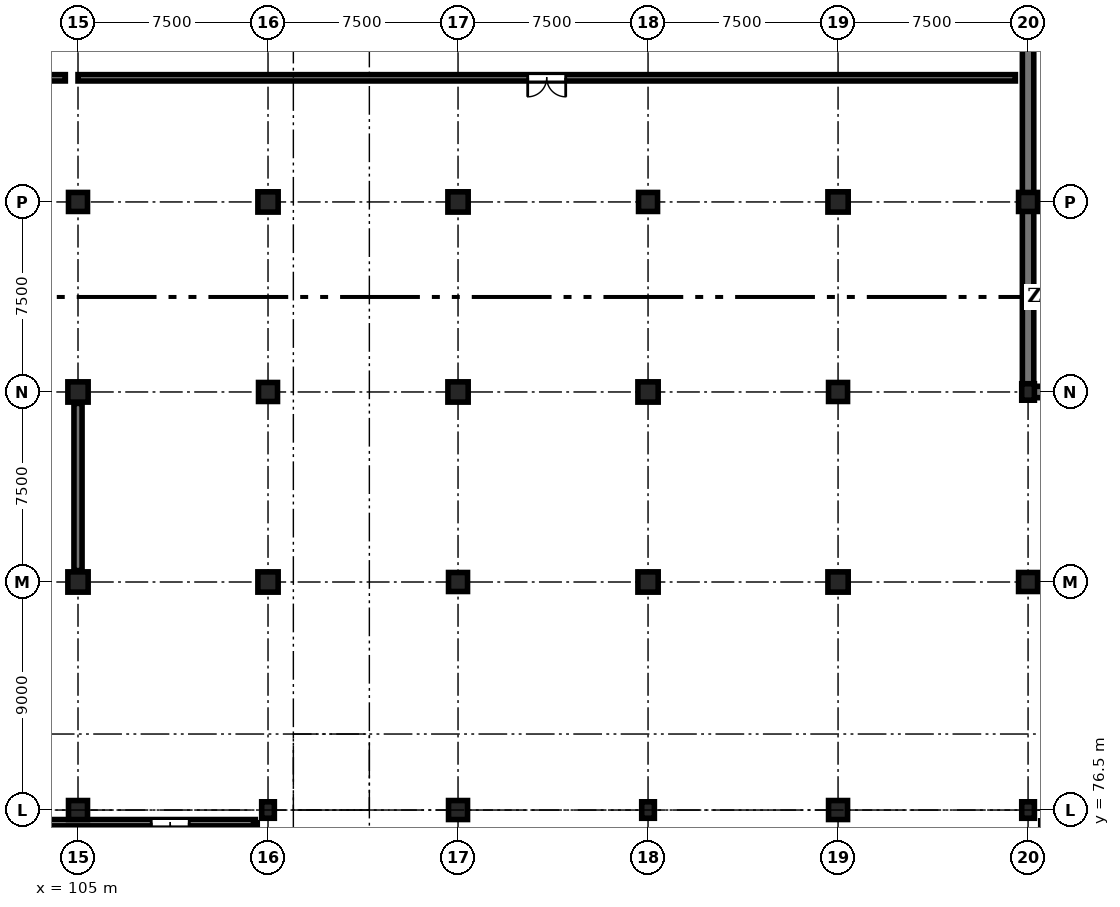
"""IFC4 building model, lengths in metres.
Left out: names, types, materials, properties, quantities, classifications, styles, units other than length and angle.
Written with IfcOpenShell. Run it as: python <this file> out.ifc"""

import sys

from ifc_helpers import new_model, si_unit, direction, frame, frame_2d, origin, origin_2d, place, context, subcontext, project, spatial, rectangle, circle, extrude, element, fill, save


model = new_model("IFC4")
c1 = context("Model", 3, precision=1e-05, world=origin(), true_north=direction((0.0, 1.0)))
c2 = subcontext(c1, "Body", "Model", "MODEL_VIEW")
j1 = project(units=[si_unit("LENGTHUNIT", "METRE"), si_unit("PLANEANGLEUNIT", "RADIAN")], contexts=[c1])
p1 = place(None, origin())
s1 = spatial("IfcSite", under=j1, at=p1, CompositionType="ELEMENT")
p2 = place(p1, origin())
s2 = spatial("IfcBuilding", under=s1, at=p2, CompositionType="ELEMENT")
p3 = place(p2, frame((0.0, 0.0, -4.5)))
s3 = spatial("IfcBuildingStorey", under=s2, at=p3, CompositionType="ELEMENT", Elevation=-4.5)
p4 = place(p3, frame((105.0, 76.5, 0.0), z_axis=(0.0, 0.0, 1.0), x_axis=(1.0, 0.0, 0.0)))
e1 = element("IfcColumn", 1, at=p4, inside=s3, PredefinedType="COLUMN", context=c2, shape_type="SweptSolid", body=[
    extrude(rectangle(XDim=0.75, YDim=0.75, at=origin_2d()), origin(), (0.0, 0.0, 1.0), 4.5),
])
for number, where, z_axis, x_axis in (
    (2, (105.0, 85.5, 0.0), (0.0, 0.0, 1.0), (1.0, 0.0, 0.0)),
    (3, (105.0, 93.0, 0.0), (0.0, 0.0, 1.0), (1.0, 0.0, 0.0)),
):
    element("IfcColumn", number, at=place(p3, frame(where, z_axis=z_axis, x_axis=x_axis)), inside=s3, PredefinedType="COLUMN", context=c2, shape_type="SweptSolid", body=[
        extrude(rectangle(XDim=0.8, YDim=0.8, at=origin_2d()), origin(), (0.0, 0.0, 1.0), 4.5),
    ])
p5 = place(p3, frame((105.0, 100.5, 0.0), z_axis=(0.0, 0.0, 1.0), x_axis=(1.0, 0.0, 0.0)))
e4 = element("IfcColumn", 4, at=p5, inside=s3, PredefinedType="COLUMN", context=c2, shape_type="SweptSolid", body=[
    extrude(circle(Radius=0.375, at=origin_2d()), origin(), (0.0, 0.0, 1.0), 4.5),
])
p6 = place(p3, frame((112.5, 76.5, 0.0), z_axis=(0.0, 0.0, 1.0), x_axis=(1.0, 0.0, 0.0)))
e5 = element("IfcColumn", 5, at=p6, inside=s3, PredefinedType="COLUMN", context=c2, shape_type="SweptSolid", body=[
    extrude(rectangle(XDim=0.5, YDim=0.65, at=origin_2d()), origin(), (0.0, 0.0, 1.0), 4.5),
])
p7 = place(p3, frame((112.5, 85.5, 0.0), z_axis=(0.0, 0.0, 1.0), x_axis=(1.0, 0.0, 0.0)))
e6 = element("IfcColumn", 6, at=p7, inside=s3, PredefinedType="COLUMN", context=c2, shape_type="SweptSolid", body=[
    extrude(rectangle(XDim=0.8, YDim=0.8, at=origin_2d()), origin(), (0.0, 0.0, 1.0), 4.5),
])
p8 = place(p3, frame((112.5, 93.0, 0.0), z_axis=(0.0, 0.0, 1.0), x_axis=(1.0, 0.0, 0.0)))
e7 = element("IfcColumn", 7, at=p8, inside=s3, PredefinedType="COLUMN", context=c2, shape_type="SweptSolid", body=[
    extrude(circle(Radius=0.375, at=origin_2d()), origin(), (0.0, 0.0, 1.0), 4.5),
])
p9 = place(p3, frame((112.5, 100.5, 0.0), z_axis=(0.0, 0.0, 1.0), x_axis=(1.0, 0.0, 0.0)))
e8 = element("IfcColumn", 8, at=p9, inside=s3, PredefinedType="COLUMN", context=c2, shape_type="SweptSolid", body=[
    extrude(rectangle(XDim=0.8, YDim=0.8, at=origin_2d()), origin(), (0.0, 0.0, 1.0), 4.5),
])
p10 = place(p3, frame((120.0, 76.5, 0.0), z_axis=(0.0, 0.0, 1.0), x_axis=(1.0, 0.0, 0.0)))
e9 = element("IfcColumn", 9, at=p10, inside=s3, PredefinedType="COLUMN", context=c2, shape_type="SweptSolid", body=[
    extrude(rectangle(XDim=0.75, YDim=0.75, at=origin_2d()), origin(), (0.0, 0.0, 1.0), 4.5),
])
p11 = place(p3, frame((120.0, 85.5, 0.0), z_axis=(0.0, 0.0, 1.0), x_axis=(1.0, 0.0, 0.0)))
e10 = element("IfcColumn", 10, at=p11, inside=s3, PredefinedType="COLUMN", context=c2, shape_type="SweptSolid", body=[
    extrude(circle(Radius=0.375, at=origin_2d()), origin(), (0.0, 0.0, 1.0), 4.5),
])
for number, where, z_axis, x_axis in (
    (11, (120.0, 93.0, 0.0), (0.0, 0.0, 1.0), (1.0, 0.0, 0.0)),
    (12, (120.0, 100.5, 0.0), (0.0, 0.0, 1.0), (1.0, 0.0, 0.0)),
):
    element("IfcColumn", number, at=place(p3, frame(where, z_axis=z_axis, x_axis=x_axis)), inside=s3, PredefinedType="COLUMN", context=c2, shape_type="SweptSolid", body=[
        extrude(rectangle(XDim=0.8, YDim=0.8, at=origin_2d()), origin(), (0.0, 0.0, 1.0), 4.5),
    ])
p12 = place(p3, frame((127.5, 76.5, 0.0), z_axis=(0.0, 0.0, 1.0), x_axis=(1.0, 0.0, 0.0)))
e13 = element("IfcColumn", 13, at=p12, inside=s3, PredefinedType="COLUMN", context=c2, shape_type="SweptSolid", body=[
    extrude(rectangle(XDim=0.5, YDim=0.65, at=origin_2d()), origin(), (0.0, 0.0, 1.0), 4.5),
])
for number, where, z_axis, x_axis in (
    (14, (127.5, 85.5, 0.0), (0.0, 0.0, 1.0), (1.0, 0.0, 0.0)),
    (15, (127.5, 93.0, 0.0), (0.0, 0.0, 1.0), (1.0, 0.0, 0.0)),
):
    element("IfcColumn", number, at=place(p3, frame(where, z_axis=z_axis, x_axis=x_axis)), inside=s3, PredefinedType="COLUMN", context=c2, shape_type="SweptSolid", body=[
        extrude(rectangle(XDim=0.8, YDim=0.8, at=origin_2d()), origin(), (0.0, 0.0, 1.0), 4.5),
    ])
p13 = place(p3, frame((127.5, 100.5, 0.0), z_axis=(0.0, 0.0, 1.0), x_axis=(1.0, 0.0, 0.0)))
e16 = element("IfcColumn", 16, at=p13, inside=s3, PredefinedType="COLUMN", context=c2, shape_type="SweptSolid", body=[
    extrude(circle(Radius=0.375, at=origin_2d()), origin(), (0.0, 0.0, 1.0), 4.5),
])
p14 = place(p3, frame((135.0, 76.5, 0.0), z_axis=(0.0, 0.0, 1.0), x_axis=(1.0, 0.0, 0.0)))
e17 = element("IfcColumn", 17, at=p14, inside=s3, PredefinedType="COLUMN", context=c2, shape_type="SweptSolid", body=[
    extrude(rectangle(XDim=0.75, YDim=0.75, at=origin_2d()), origin(), (0.0, 0.0, 1.0), 4.5),
])
p15 = place(p3, frame((135.0, 85.5, 0.0), z_axis=(0.0, 0.0, 1.0), x_axis=(1.0, 0.0, 0.0)))
e18 = element("IfcColumn", 18, at=p15, inside=s3, PredefinedType="COLUMN", context=c2, shape_type="SweptSolid", body=[
    extrude(rectangle(XDim=0.8, YDim=0.8, at=origin_2d()), origin(), (0.0, 0.0, 1.0), 4.5),
])
p16 = place(p3, frame((135.0, 93.0, 0.0), z_axis=(0.0, 0.0, 1.0), x_axis=(1.0, 0.0, 0.0)))
e19 = element("IfcColumn", 19, at=p16, inside=s3, PredefinedType="COLUMN", context=c2, shape_type="SweptSolid", body=[
    extrude(circle(Radius=0.375, at=origin_2d()), origin(), (0.0, 0.0, 1.0), 4.5),
])
p17 = place(p3, frame((135.0, 100.5, 0.0), z_axis=(0.0, 0.0, 1.0), x_axis=(1.0, 0.0, 0.0)))
e20 = element("IfcColumn", 20, at=p17, inside=s3, PredefinedType="COLUMN", context=c2, shape_type="SweptSolid", body=[
    extrude(rectangle(XDim=0.8, YDim=0.8, at=origin_2d()), origin(), (0.0, 0.0, 1.0), 4.5),
])
p18 = place(p3, frame((142.5, 76.5, 0.0), z_axis=(0.0, 0.0, 1.0), x_axis=(1.0, 0.0, 0.0)))
e21 = element("IfcColumn", 21, at=p18, inside=s3, PredefinedType="COLUMN", context=c2, shape_type="SweptSolid", body=[
    extrude(rectangle(XDim=0.5, YDim=0.65, at=origin_2d()), origin(), (0.0, 0.0, 1.0), 4.5),
])
p19 = place(p3, frame((142.5, 85.5, 0.0), z_axis=(0.0, 0.0, 1.0), x_axis=(1.0, 0.0, 0.0)))
e22 = element("IfcColumn", 22, at=p19, inside=s3, PredefinedType="COLUMN", context=c2, shape_type="SweptSolid", body=[
    extrude(rectangle(XDim=0.75, YDim=0.75, at=origin_2d()), origin(), (0.0, 0.0, 1.0), 4.5),
])
p20 = place(p3, frame((142.5, 93.0, 0.0), z_axis=(0.0, 0.0, 1.0), x_axis=(1.0, 0.0, 0.0)))
e23 = element("IfcColumn", 23, at=p20, inside=s3, PredefinedType="COLUMN", context=c2, shape_type="SweptSolid", body=[
    extrude(rectangle(XDim=0.5, YDim=0.65, at=origin_2d()), origin(), (0.0, 0.0, 1.0), 4.5),
])
p21 = place(p3, frame((142.5, 100.5, 0.0), z_axis=(0.0, 0.0, 1.0), x_axis=(1.0, 0.0, 0.0)))
e24 = element("IfcColumn", 24, at=p21, inside=s3, PredefinedType="COLUMN", context=c2, shape_type="SweptSolid", body=[
    extrude(rectangle(XDim=0.75, YDim=0.75, at=origin_2d()), origin(), (0.0, 0.0, 1.0), 4.5),
])
p22 = place(p3, frame((142.5, 109.5, 0.0), z_axis=(0.0, 0.0, 1.0), x_axis=(0.0, -1.0, 0.0)))
e25 = element("IfcWall", 25, at=p22, inside=s3, PredefinedType="SOLIDWALL", context=c2, shape_type="SweptSolid", body=[
    extrude(rectangle(XDim=9.0, YDim=0.45, at=frame_2d((4.5, 0.0))), origin(), (0.0, 0.0, 1.0), 4.14),
])
for number, where, z_axis, x_axis in (
    (26, (142.5, 100.5, 0.0), (0.0, 0.0, 1.0), (0.0, -1.0, 0.0)),
    (27, (142.5, 93.0, 0.0), (0.0, 0.0, 1.0), (1.0, 0.0, 0.0)),
):
    element("IfcWall", number, at=place(p3, frame(where, z_axis=z_axis, x_axis=x_axis)), inside=s3, PredefinedType="SOLIDWALL", context=c2, shape_type="SweptSolid", body=[
        extrude(rectangle(XDim=7.5, YDim=0.45, at=frame_2d((3.75, 0.0))), origin(), (0.0, 0.0, 1.0), 4.14),
    ])
p23 = place(p3, frame((105.0, 85.95, 0.0), z_axis=(0.0, 0.0, 1.0), x_axis=(0.0, 1.0, 0.0)))
e28 = element("IfcWall", 28, at=p23, inside=s3, PredefinedType="SHEAR", context=c2, shape_type="SweptSolid", body=[
    extrude(rectangle(XDim=6.6, YDim=0.32, at=frame_2d((3.3, 0.0))), origin(), (0.0, 0.0, 1.0), 3.59),
])
p24 = place(p3, frame((112.0, 76.0, 0.0), z_axis=(0.0, 0.0, 1.0), x_axis=(-1.0, 0.0, 0.0)))
e29 = element("IfcWall", 29, at=p24, inside=s3, PredefinedType="STANDARD", context=c2, shape_type="SweptSolid", body=[
    extrude(rectangle(XDim=25.6, YDim=0.25, at=frame_2d((12.8, 0.0))), origin(), (0.0, 0.0, 1.0), 4.125),
])
p25 = place(p24, frame((2.61, 0.0, 0.0)))
e30 = element("IfcOpeningElement", 30, at=p25, cuts=e29, PredefinedType="OPENING", context=c2, shape_type="SweptSolid", body=[
    extrude(rectangle(XDim=1.5, YDim=2.3, at=frame_2d((0.75, 1.15))), frame((0.0, 0.135, 0.0), z_axis=(0.0, -1.0, 0.0), x_axis=(1.0, 0.0, 0.0)), (0.0, 0.0, 1.0), 0.27),
])
p26 = place(p3, frame((104.5, 105.4, 0.0), z_axis=(0.0, 0.0, 1.0), x_axis=(-1.0, 0.0, 0.0)))
e31 = element("IfcWall", 31, at=p26, inside=s3, PredefinedType="STANDARD", context=c2, shape_type="SweptSolid", body=[
    extrude(rectangle(XDim=37.0, YDim=0.25, at=frame_2d((18.5, 0.0))), origin(), (0.0, 0.0, 1.0), 4.125),
])
p27 = place(p26, frame((17.75, 0.0, 0.0)))
e32 = element("IfcOpeningElement", 32, at=p27, cuts=e31, PredefinedType="OPENING", context=c2, shape_type="SweptSolid", body=[
    extrude(rectangle(XDim=1.5, YDim=2.3, at=frame_2d((0.75, 1.15))), frame((0.0, 0.135, 0.0), z_axis=(0.0, -1.0, 0.0), x_axis=(1.0, 0.0, 0.0)), (0.0, 0.0, 1.0), 0.27),
])
p28 = place(p3, frame((142.0, 105.4, 0.0), z_axis=(0.0, 0.0, 1.0), x_axis=(-1.0, 0.0, 0.0)))
e33 = element("IfcWall", 33, at=p28, inside=s3, PredefinedType="STANDARD", context=c2, shape_type="SweptSolid", body=[
    extrude(rectangle(XDim=37.0, YDim=0.25, at=frame_2d((18.5, 0.0))), origin(), (0.0, 0.0, 1.0), 4.125),
])
p29 = place(p28, frame((17.75, 0.0, 0.0)))
e34 = element("IfcOpeningElement", 34, at=p29, cuts=e33, PredefinedType="OPENING", context=c2, shape_type="SweptSolid", body=[
    extrude(rectangle(XDim=1.5, YDim=2.3, at=frame_2d((0.75, 1.15))), frame((0.0, 0.135, 0.0), z_axis=(0.0, -1.0, 0.0), x_axis=(1.0, 0.0, 0.0)), (0.0, 0.0, 1.0), 0.27),
])
p30 = place(p3, frame((112.0, 54.2, 0.0), z_axis=(0.0, 0.0, 1.0), x_axis=(0.0, 1.0, 0.0)))
e35 = element("IfcWall", 35, at=p30, inside=s3, PredefinedType="PARTITIONING", context=c2, shape_type="SweptSolid", body=[
    extrude(rectangle(XDim=21.8, YDim=0.15, at=frame_2d((10.9, 0.0))), origin(), (0.0, 0.0, 1.0), 4.125),
])
p31 = place(p25, origin())
e36 = element("IfcDoor", 36, at=p31, inside=s3, OperationType="DOUBLE_DOOR_SINGLE_SWING", PredefinedType="DOOR", context=c2, shape_type="SweptSolid", body=[
    extrude(rectangle(XDim=1.5, YDim=2.3, at=frame_2d((0.75, 1.15))), frame((0.0, 0.025, 0.0), z_axis=(0.0, -1.0, 0.0), x_axis=(1.0, 0.0, 0.0)), (0.0, 0.0, 1.0), 0.05),
])
fill(e30, e36)
p32 = place(p29, origin())
e37 = element("IfcDoor", 37, at=p32, inside=s3, OperationType="DOUBLE_DOOR_SINGLE_SWING", PredefinedType="DOOR", context=c2, shape_type="SweptSolid", body=[
    extrude(rectangle(XDim=1.5, YDim=2.3, at=frame_2d((0.75, 1.15))), frame((0.0, 0.025, 0.0), z_axis=(0.0, -1.0, 0.0), x_axis=(1.0, 0.0, 0.0)), (0.0, 0.0, 1.0), 0.05),
])
fill(e34, e37)
save(model, sys.argv[1])
